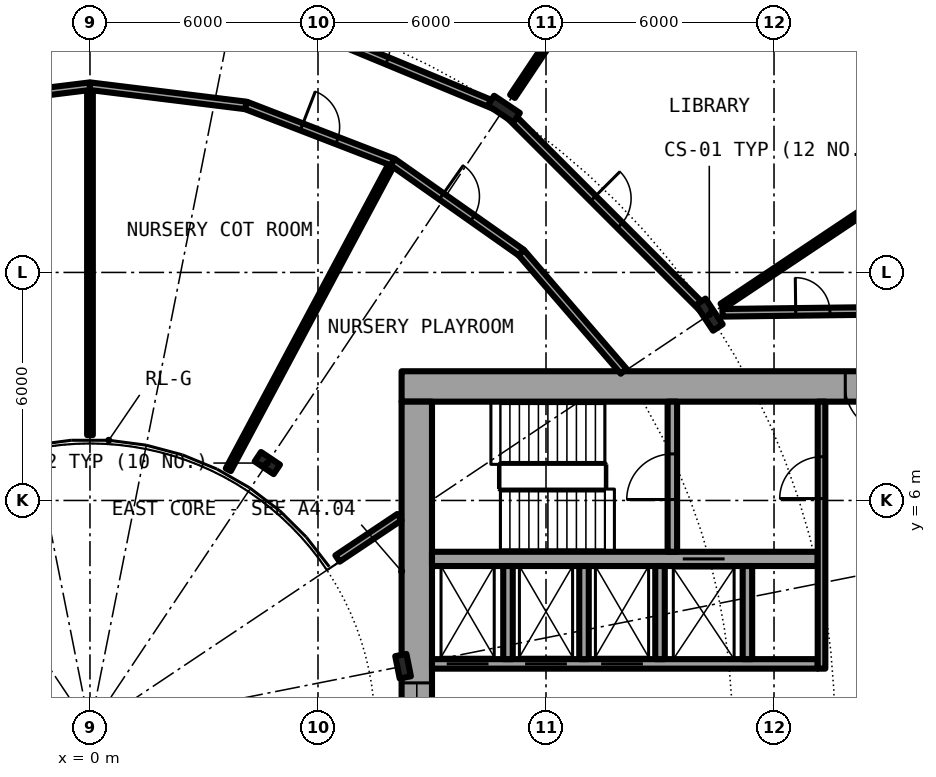
"""IFC4 building model, lengths in metres.
Left out: names, types, materials, properties, quantities, classifications, styles, units other than length and angle.
Written with IfcOpenShell. Run it as: python <this file> out.ifc"""

import sys

from ifc_helpers import new_model, si_unit, direction, frame, frame_2d, origin, origin_2d, place, context, subcontext, project, spatial, rectangle, i_section, extrude, element, fill, save


model = new_model("IFC4")
c1 = context("Model", 3, precision=1e-05, world=origin(), true_north=direction((0.0, 1.0)))
c2 = subcontext(c1, "Body", "Model", "MODEL_VIEW")
j1 = project(units=[si_unit("LENGTHUNIT", "METRE"), si_unit("PLANEANGLEUNIT", "RADIAN")], contexts=[c1])
p1 = place(None, origin())
s1 = spatial("IfcSite", under=j1, at=p1, CompositionType="ELEMENT")
p2 = place(p1, origin())
s2 = spatial("IfcBuilding", under=s1, at=p2, CompositionType="ELEMENT")
p3 = place(p2, frame((0.0, 0.0, 14.1)))
s3 = spatial("IfcBuildingStorey", under=s2, at=p3, CompositionType="ELEMENT", Elevation=14.1)
for number, where, z_axis, x_axis in (
    (1, (16.297, 10.889, 0.0), (0.0, 0.0, 1.0), (0.831, 0.556, 0.0)),
    (2, (10.889, 16.297, 0.0), (0.0, 0.0, 1.0), (0.556, 0.831, 0.0)),
):
    element("IfcColumn", number, at=place(p3, frame(where, z_axis=z_axis, x_axis=x_axis)), inside=s3, PredefinedType="COLUMN", context=c2, shape_type="SweptSolid", body=[
        extrude(i_section(OverallWidth=0.303, OverallDepth=0.814, WebThickness=0.021, FlangeThickness=0.04, FilletRadius=0.03, at=origin_2d()), origin(), (0.0, 0.0, 1.0), 4.2),
    ])
for number, where, z_axis, x_axis in (
    (3, (8.239, 1.639, 0.0), (0.0, 0.0, 1.0), (0.981, 0.195, 0.0)),
    (4, (4.667, 6.984, 0.0), (0.0, 0.0, 1.0), (0.556, 0.831, 0.0)),
):
    element("IfcColumn", number, at=place(p3, frame(where, z_axis=z_axis, x_axis=x_axis)), inside=s3, PredefinedType="COLUMN", context=c2, shape_type="SweptSolid", body=[
        extrude(i_section(OverallWidth=0.3, OverallDepth=0.6, WebThickness=0.015, FlangeThickness=0.03, FilletRadius=0.027, at=origin_2d()), origin(), (0.0, 0.0, 1.0), 4.2),
    ])
p4 = place(p3, frame((22.4, 9.0, 0.0), z_axis=(0.0, 0.0, 1.0), x_axis=(-1.0, 0.0, 0.0)))
e5 = element("IfcWall", 5, at=p4, inside=s3, PredefinedType="SHEAR", context=c2, shape_type="SweptSolid", body=[
    extrude(rectangle(XDim=14.2, YDim=0.8, at=frame_2d((7.1, 0.0))), origin(), (0.0, 0.0, 1.0), 4.2),
])
p5 = place(p4, frame((1.325, 0.0, 0.0)))
e6 = element("IfcOpeningElement", 6, at=p5, cuts=e5, PredefinedType="OPENING", context=c2, shape_type="SweptSolid", body=[
    extrude(rectangle(XDim=1.2, YDim=2.3, at=frame_2d((0.6, 1.15))), frame((0.0, 0.41, 0.0), z_axis=(0.0, -1.0, 0.0), x_axis=(1.0, 0.0, 0.0)), (0.0, 0.0, 1.0), 0.82),
])
p6 = place(p3, frame((8.6, -8.6, 0.0), z_axis=(0.0, 0.0, 1.0), x_axis=(0.0, 1.0, 0.0)))
e7 = element("IfcWall", 7, at=p6, inside=s3, PredefinedType="SHEAR", context=c2, shape_type="SweptSolid", body=[
    extrude(rectangle(XDim=17.2, YDim=0.8, at=frame_2d((8.6, 0.0))), origin(), (0.0, 0.0, 1.0), 4.2),
])
p7 = place(p6, frame((7.4, 0.0, 0.1)))
e8 = element("IfcOpeningElement", 8, at=p7, cuts=e7, PredefinedType="OPENING", context=c2, shape_type="SweptSolid", body=[
    extrude(rectangle(XDim=2.4, YDim=2.2, at=frame_2d((1.2, 1.1))), frame((0.0, 0.41, 0.0), z_axis=(0.0, -1.0, 0.0), x_axis=(1.0, 0.0, 0.0)), (0.0, 0.0, 1.0), 0.82),
])
p8 = place(p3, frame((9.0, 1.7, 0.0), z_axis=(0.0, 0.0, 1.0), x_axis=(1.0, 0.0, 0.0)))
e9 = element("IfcWall", 9, at=p8, inside=s3, PredefinedType="SHEAR", context=c2, shape_type="SweptSolid", body=[
    extrude(rectangle(XDim=10.15, YDim=0.25, at=frame_2d((5.075, 0.0))), origin(), (0.0, 0.0, 1.0), 4.2),
])
p9 = place(p8, frame((0.387, 0.0, 0.0)))
e10 = element("IfcOpeningElement", 10, at=p9, cuts=e9, PredefinedType="OPENING", context=c2, shape_type="SweptSolid", body=[
    extrude(rectangle(XDim=1.1, YDim=2.3, at=frame_2d((0.55, 1.15))), frame((0.0, 0.135, 0.0), z_axis=(0.0, -1.0, 0.0), x_axis=(1.0, 0.0, 0.0)), (0.0, 0.0, 1.0), 0.27),
])
p10 = place(p8, frame((2.45, 0.0, 0.0)))
e11 = element("IfcOpeningElement", 11, at=p10, cuts=e9, PredefinedType="OPENING", context=c2, shape_type="SweptSolid", body=[
    extrude(rectangle(XDim=1.1, YDim=2.3, at=frame_2d((0.55, 1.15))), frame((0.0, 0.135, 0.0), z_axis=(0.0, -1.0, 0.0), x_axis=(1.0, 0.0, 0.0)), (0.0, 0.0, 1.0), 0.27),
])
p11 = place(p8, frame((4.45, 0.0, 0.0)))
e12 = element("IfcOpeningElement", 12, at=p11, cuts=e9, PredefinedType="OPENING", context=c2, shape_type="SweptSolid", body=[
    extrude(rectangle(XDim=1.1, YDim=2.3, at=frame_2d((0.55, 1.15))), frame((0.0, 0.135, 0.0), z_axis=(0.0, -1.0, 0.0), x_axis=(1.0, 0.0, 0.0)), (0.0, 0.0, 1.0), 0.27),
])
p12 = place(p3, frame((9.0, 4.462, 0.0), z_axis=(0.0, 0.0, 1.0), x_axis=(1.0, 0.0, 0.0)))
e13 = element("IfcWall", 13, at=p12, inside=s3, PredefinedType="SHEAR", context=c2, shape_type="SweptSolid", body=[
    extrude(rectangle(XDim=10.15, YDim=0.375, at=frame_2d((5.075, 0.0))), origin(), (0.0, 0.0, 1.0), 4.2),
])
p13 = place(p12, frame((6.6, 0.0, 0.0)))
e14 = element("IfcOpeningElement", 14, at=p13, cuts=e13, PredefinedType="OPENING", context=c2, shape_type="SweptSolid", body=[
    extrude(rectangle(XDim=1.1, YDim=2.3, at=frame_2d((0.55, 1.15))), frame((0.0, 0.198, 0.0), z_axis=(0.0, -1.0, 0.0), x_axis=(1.0, 0.0, 0.0)), (0.0, 0.0, 1.0), 0.395),
])
p14 = place(p3, frame((15.325, 4.65, 0.0), z_axis=(0.0, 0.0, 1.0), x_axis=(0.0, 1.0, 0.0)))
e15 = element("IfcWall", 15, at=p14, inside=s3, PredefinedType="SHEAR", context=c2, shape_type="SweptSolid", body=[
    extrude(rectangle(XDim=3.95, YDim=0.25, at=frame_2d((1.975, 0.0))), origin(), (0.0, 0.0, 1.0), 4.2),
])
p15 = place(p14, frame((1.375, 0.0, 0.0)))
e16 = element("IfcOpeningElement", 16, at=p15, cuts=e15, PredefinedType="OPENING", context=c2, shape_type="SweptSolid", body=[
    extrude(rectangle(XDim=1.2, YDim=2.3, at=frame_2d((0.6, 1.15))), frame((0.0, 0.135, 0.0), z_axis=(0.0, -1.0, 0.0), x_axis=(1.0, 0.0, 0.0)), (0.0, 0.0, 1.0), 0.27),
])
for number, where, z_axis, x_axis in (
    (17, (15.0, 1.825, 0.0), (0.0, 0.0, 1.0), (0.0, 1.0, 0.0)),
    (18, (17.3, 1.825, 0.0), (0.0, 0.0, 1.0), (0.0, 1.0, 0.0)),
):
    element("IfcWall", number, at=place(p3, frame(where, z_axis=z_axis, x_axis=x_axis)), inside=s3, PredefinedType="SOLIDWALL", context=c2, shape_type="SweptSolid", body=[
        extrude(rectangle(XDim=2.45, YDim=0.25, at=frame_2d((1.225, 0.0))), origin(), (0.0, 0.0, 1.0), 3.8),
    ])
p16 = place(p3, frame((19.25, 1.575, 0.0), z_axis=(0.0, 0.0, 1.0), x_axis=(0.0, 1.0, 0.0)))
e19 = element("IfcWall", 19, at=p16, inside=s3, PredefinedType="SOLIDWALL", context=c2, shape_type="SweptSolid", body=[
    extrude(rectangle(XDim=7.025, YDim=0.2, at=frame_2d((3.513, 0.0))), origin(), (0.0, 0.0, 1.0), 3.8),
])
p17 = place(p16, frame((4.475, 0.0, 0.0)))
e20 = element("IfcOpeningElement", 20, at=p17, cuts=e19, PredefinedType="OPENING", context=c2, shape_type="SweptSolid", body=[
    extrude(rectangle(XDim=1.1, YDim=2.3, at=frame_2d((0.55, 1.15))), frame((0.0, 0.11, 0.0), z_axis=(0.0, -1.0, 0.0), x_axis=(1.0, 0.0, 0.0)), (0.0, 0.0, 1.0), 0.22),
])
for number, where, z_axis, x_axis in (
    (21, (11.0, 1.825, 0.0), (0.0, 0.0, 1.0), (0.0, 1.0, 0.0)),
    (22, (13.0, 1.825, 0.0), (0.0, 0.0, 1.0), (0.0, 1.0, 0.0)),
):
    element("IfcWall", number, at=place(p3, frame(where, z_axis=z_axis, x_axis=x_axis)), inside=s3, PredefinedType="SOLIDWALL", context=c2, shape_type="SweptSolid", body=[
        extrude(rectangle(XDim=2.45, YDim=0.25, at=frame_2d((1.225, 0.0))), origin(), (0.0, 0.0, 1.0), 3.8),
    ])
p18 = place(p3, frame((0.0, 7.72, 0.0), z_axis=(0.0, 0.0, 1.0), x_axis=(0.0, 1.0, 0.0)))
e23 = element("IfcWall", 23, at=p18, inside=s3, PredefinedType="PARTITIONING", context=c2, shape_type="SweptSolid", body=[
    extrude(rectangle(XDim=9.18, YDim=0.15, at=frame_2d((4.59, 0.0))), origin(), (0.0, 0.0, 1.0), 3.8),
])
p19 = place(p3, frame((3.64, 6.808, 0.0), z_axis=(0.0, 0.0, 1.0), x_axis=(0.471460365694, 0.881887251059, 0.0)))
e24 = element("IfcWall", 24, at=p19, inside=s3, PredefinedType="PARTITIONING", context=c2, shape_type="SweptSolid", body=[
    extrude(rectangle(XDim=9.18, YDim=0.15, at=frame_2d((4.59, 0.0))), origin(), (0.0, 0.0, 1.0), 3.8),
])
p20 = place(p3, frame((11.118, 16.633, 0.0), z_axis=(0.0, 0.0, 1.0), x_axis=(0.555650828752, 0.831415754305, 0.0)))
e25 = element("IfcWall", 25, at=p20, inside=s3, PredefinedType="PARTITIONING", context=c2, shape_type="SweptSolid", body=[
    extrude(rectangle(XDim=7.168, YDim=0.15, at=frame_2d((3.584, 0.0))), origin(), (0.0, 0.0, 1.0), 3.8),
])
p21 = place(p3, frame((16.635, 11.115, 0.0), z_axis=(0.0, 0.0, 1.0), x_axis=(0.831431488123, 0.555627285648, 0.0)))
e26 = element("IfcWall", 26, at=p21, inside=s3, PredefinedType="PARTITIONING", context=c2, shape_type="SweptSolid", body=[
    extrude(rectangle(XDim=7.168, YDim=0.15, at=frame_2d((3.584, 0.0))), origin(), (0.0, 0.0, 1.0), 3.8),
])
p22 = place(p3, frame((6.513, 4.472, 0.0), z_axis=(0.0, 0.0, 1.0), x_axis=(0.831417956244, 0.555647533996, 0.0)))
e27 = element("IfcWall", 27, at=p22, inside=s3, PredefinedType="PARTITIONING", context=c2, shape_type="SweptSolid", body=[
    extrude(rectangle(XDim=1.962, YDim=0.2, at=frame_2d((0.981, 0.0))), origin(), (0.0, 0.0, 1.0), 3.8),
])
p23 = place(p3, frame((16.643, 10.938, 0.0), z_axis=(0.0, 0.0, 1.0), x_axis=(0.999924074118, 0.012322580895, 0.0)))
e28 = element("IfcWall", 28, at=p23, inside=s3, PredefinedType="PARTITIONING", context=c2, shape_type="SweptSolid", body=[
    extrude(rectangle(XDim=5.032, YDim=0.2, at=frame_2d((2.516, 0.0))), origin(), (0.0, 0.0, 1.0), 3.8),
])
p24 = place(p23, frame((1.928, 0.0, 0.0)))
e29 = element("IfcOpeningElement", 29, at=p24, cuts=e28, PredefinedType="OPENING", context=c2, shape_type="SweptSolid", body=[
    extrude(rectangle(XDim=0.9, YDim=2.3, at=frame_2d((0.45, 1.15))), frame((0.0, 0.11, 0.0), z_axis=(0.0, -1.0, 0.0), x_axis=(1.0, 0.0, 0.0)), (0.0, 0.0, 1.0), 0.22),
])
for number, where, z_axis, x_axis in (
    (30, (-4.106, 16.394, 0.0), (0.0, 0.0, 1.0), (0.992, 0.122, 0.0)),
    (31, (0.0, 16.9, 0.0), (0.0, 0.0, 1.0), (0.992, -0.122, 0.0)),
):
    element("IfcWall", number, at=place(p3, frame(where, z_axis=z_axis, x_axis=x_axis)), inside=s3, PredefinedType="PARTITIONING", context=c2, shape_type="SweptSolid", body=[
        extrude(rectangle(XDim=4.137, YDim=0.2, at=frame_2d((2.068, 0.0))), origin(), (0.0, 0.0, 1.0), 3.8),
    ])
p25 = place(p3, frame((4.106, 16.394, 0.0), z_axis=(0.0, 0.0, 1.0), x_axis=(0.932943640288, -0.360022449363, 0.0)))
e32 = element("IfcWall", 32, at=p25, inside=s3, PredefinedType="PARTITIONING", context=c2, shape_type="SweptSolid", body=[
    extrude(rectangle(XDim=4.139, YDim=0.2, at=frame_2d((2.069, 0.0))), origin(), (0.0, 0.0, 1.0), 3.8),
])
p26 = place(p25, frame((1.569, 0.0, 0.0)))
e33 = element("IfcOpeningElement", 33, at=p26, cuts=e32, PredefinedType="OPENING", context=c2, shape_type="SweptSolid", body=[
    extrude(rectangle(XDim=1.0, YDim=2.3, at=frame_2d((0.5, 1.15))), frame((0.0, 0.11, 0.0), z_axis=(0.0, -1.0, 0.0), x_axis=(1.0, 0.0, 0.0)), (0.0, 0.0, 1.0), 0.22),
])
p27 = place(p3, frame((7.967, 14.904, 0.0), z_axis=(0.0, 0.0, 1.0), x_axis=(0.817567680547, -0.575832517079, 0.0)))
e34 = element("IfcWall", 34, at=p27, inside=s3, PredefinedType="PARTITIONING", context=c2, shape_type="SweptSolid", body=[
    extrude(rectangle(XDim=4.137, YDim=0.2, at=frame_2d((2.068, 0.0))), origin(), (0.0, 0.0, 1.0), 3.8),
])
p28 = place(p27, frame((1.568, 0.0, 0.0)))
e35 = element("IfcOpeningElement", 35, at=p28, cuts=e34, PredefinedType="OPENING", context=c2, shape_type="SweptSolid", body=[
    extrude(rectangle(XDim=1.0, YDim=2.3, at=frame_2d((0.5, 1.15))), frame((0.0, 0.11, 0.0), z_axis=(0.0, -1.0, 0.0), x_axis=(1.0, 0.0, 0.0)), (0.0, 0.0, 1.0), 0.22),
])
p29 = place(p3, frame((11.349, 12.522, 0.0), z_axis=(0.0, 0.0, 1.0), x_axis=(0.653274518104, -0.757121129012, 0.0)))
e36 = element("IfcWall", 36, at=p29, inside=s3, PredefinedType="PARTITIONING", context=c2, shape_type="SweptSolid", body=[
    extrude(rectangle(XDim=4.124, YDim=0.2, at=frame_2d((2.062, 0.0))), origin(), (0.0, 0.0, 1.0), 3.8),
])
p30 = place(p3, frame((3.966, 19.164, 0.0), z_axis=(0.0, 0.0, 1.0), x_axis=(0.923912243701, -0.382604451019, 0.0)))
e37 = element("IfcWall", 37, at=p30, inside=s3, PredefinedType="PARTITIONING", context=c2, shape_type="SweptSolid", body=[
    extrude(rectangle(XDim=7.339, YDim=0.2, at=frame_2d((3.67, 0.0))), origin(), (0.0, 0.0, 1.0), 3.38),
])
p31 = place(p30, frame((3.17, 0.0, 0.0)))
e38 = element("IfcOpeningElement", 38, at=p31, cuts=e37, PredefinedType="OPENING", context=c2, shape_type="SweptSolid", body=[
    extrude(rectangle(XDim=1.0, YDim=2.3, at=frame_2d((0.5, 1.15))), frame((0.0, 0.11, 0.0), z_axis=(0.0, -1.0, 0.0), x_axis=(1.0, 0.0, 0.0)), (0.0, 0.0, 1.0), 0.22),
])
p32 = place(p3, frame((10.998, 16.188, 0.0), z_axis=(0.0, 0.0, 1.0), x_axis=(0.707106781187, -0.707106781187, 0.0)))
e39 = element("IfcWall", 39, at=p32, inside=s3, PredefinedType="PARTITIONING", context=c2, shape_type="SweptSolid", body=[
    extrude(rectangle(XDim=7.34, YDim=0.2, at=frame_2d((3.67, 0.0))), origin(), (0.0, 0.0, 1.0), 3.38),
])
p33 = place(p32, frame((3.17, 0.0, 0.0)))
e40 = element("IfcOpeningElement", 40, at=p33, cuts=e39, PredefinedType="OPENING", context=c2, shape_type="SweptSolid", body=[
    extrude(rectangle(XDim=1.0, YDim=2.3, at=frame_2d((0.5, 1.15))), frame((0.0, 0.11, 0.0), z_axis=(0.0, -1.0, 0.0), x_axis=(1.0, 0.0, 0.0)), (0.0, 0.0, 1.0), 0.22),
])
p34 = place(p9, origin())
e41 = element("IfcDoor", 41, at=p34, inside=s3, OperationType="DOUBLE_DOOR_SLIDING", PredefinedType="DOOR", context=c2, shape_type="SweptSolid", body=[
    extrude(rectangle(XDim=1.1, YDim=2.3, at=frame_2d((0.55, 1.15))), frame((0.0, 0.025, 0.0), z_axis=(0.0, -1.0, 0.0), x_axis=(1.0, 0.0, 0.0)), (0.0, 0.0, 1.0), 0.05),
])
fill(e10, e41)
p35 = place(p10, origin())
e42 = element("IfcDoor", 42, at=p35, inside=s3, OperationType="DOUBLE_DOOR_SLIDING", PredefinedType="DOOR", context=c2, shape_type="SweptSolid", body=[
    extrude(rectangle(XDim=1.1, YDim=2.3, at=frame_2d((0.55, 1.15))), frame((0.0, 0.025, 0.0), z_axis=(0.0, -1.0, 0.0), x_axis=(1.0, 0.0, 0.0)), (0.0, 0.0, 1.0), 0.05),
])
fill(e11, e42)
p36 = place(p11, origin())
e43 = element("IfcDoor", 43, at=p36, inside=s3, OperationType="DOUBLE_DOOR_SLIDING", PredefinedType="DOOR", context=c2, shape_type="SweptSolid", body=[
    extrude(rectangle(XDim=1.1, YDim=2.3, at=frame_2d((0.55, 1.15))), frame((0.0, 0.025, 0.0), z_axis=(0.0, -1.0, 0.0), x_axis=(1.0, 0.0, 0.0)), (0.0, 0.0, 1.0), 0.05),
])
fill(e12, e43)
p37 = place(p13, origin())
e44 = element("IfcDoor", 44, at=p37, inside=s3, OperationType="DOUBLE_DOOR_SLIDING", PredefinedType="DOOR", context=c2, shape_type="SweptSolid", body=[
    extrude(rectangle(XDim=1.1, YDim=2.3, at=frame_2d((0.55, 1.15))), frame((0.0, 0.025, 0.0), z_axis=(0.0, -1.0, 0.0), x_axis=(1.0, 0.0, 0.0)), (0.0, 0.0, 1.0), 0.05),
])
fill(e14, e44)
p38 = place(p15, origin())
e45 = element("IfcDoor", 45, at=p38, inside=s3, OperationType="SINGLE_SWING_LEFT", PredefinedType="DOOR", context=c2, shape_type="SweptSolid", body=[
    extrude(rectangle(XDim=1.2, YDim=2.3, at=frame_2d((0.6, 1.15))), frame((0.0, 0.025, 0.0), z_axis=(0.0, -1.0, 0.0), x_axis=(1.0, 0.0, 0.0)), (0.0, 0.0, 1.0), 0.05),
])
fill(e16, e45)
p39 = place(p17, origin())
e46 = element("IfcDoor", 46, at=p39, inside=s3, OperationType="SINGLE_SWING_LEFT", PredefinedType="DOOR", context=c2, shape_type="SweptSolid", body=[
    extrude(rectangle(XDim=1.1, YDim=2.3, at=frame_2d((0.55, 1.15))), frame((0.0, 0.025, 0.0), z_axis=(0.0, -1.0, 0.0), x_axis=(1.0, 0.0, 0.0)), (0.0, 0.0, 1.0), 0.05),
])
fill(e20, e46)
p40 = place(p5, origin())
e47 = element("IfcDoor", 47, at=p40, inside=s3, OperationType="SINGLE_SWING_RIGHT", PredefinedType="DOOR", context=c2, shape_type="SweptSolid", body=[
    extrude(rectangle(XDim=1.2, YDim=2.3, at=frame_2d((0.6, 1.15))), frame((0.0, 0.025, 0.0), z_axis=(0.0, -1.0, 0.0), x_axis=(1.0, 0.0, 0.0)), (0.0, 0.0, 1.0), 0.05),
])
fill(e6, e47)
p41 = place(p7, origin())
e48 = element("IfcWindow", 48, at=p41, inside=s3, PartitioningType="SINGLE_PANEL", PredefinedType="WINDOW", context=c2, shape_type="SweptSolid", body=[
    extrude(rectangle(XDim=2.4, YDim=2.2, at=frame_2d((1.2, 1.1))), frame((0.0, 0.03, 0.0), z_axis=(0.0, -1.0, 0.0), x_axis=(1.0, 0.0, 0.0)), (0.0, 0.0, 1.0), 0.06),
])
fill(e8, e48)
p42 = place(p33, origin())
e49 = element("IfcDoor", 49, at=p42, inside=s3, OperationType="SINGLE_SWING_RIGHT", PredefinedType="DOOR", context=c2, shape_type="SweptSolid", body=[
    extrude(rectangle(XDim=1.0, YDim=2.3, at=frame_2d((0.5, 1.15))), frame((0.0, 0.025, 0.0), z_axis=(0.0, -1.0, 0.0), x_axis=(1.0, 0.0, 0.0)), (0.0, 0.0, 1.0), 0.05),
])
fill(e40, e49)
p43 = place(p31, origin())
e50 = element("IfcDoor", 50, at=p43, inside=s3, OperationType="SINGLE_SWING_RIGHT", PredefinedType="DOOR", context=c2, shape_type="SweptSolid", body=[
    extrude(rectangle(XDim=1.0, YDim=2.3, at=frame_2d((0.5, 1.15))), frame((0.0, 0.025, 0.0), z_axis=(0.0, -1.0, 0.0), x_axis=(1.0, 0.0, 0.0)), (0.0, 0.0, 1.0), 0.05),
])
fill(e38, e50)
p44 = place(p28, origin())
e51 = element("IfcDoor", 51, at=p44, inside=s3, OperationType="SINGLE_SWING_LEFT", PredefinedType="DOOR", context=c2, shape_type="SweptSolid", body=[
    extrude(rectangle(XDim=1.0, YDim=2.3, at=frame_2d((0.5, 1.15))), frame((0.0, 0.025, 0.0), z_axis=(0.0, -1.0, 0.0), x_axis=(1.0, 0.0, 0.0)), (0.0, 0.0, 1.0), 0.05),
])
fill(e35, e51)
p45 = place(p26, origin())
e52 = element("IfcDoor", 52, at=p45, inside=s3, OperationType="SINGLE_SWING_LEFT", PredefinedType="DOOR", context=c2, shape_type="SweptSolid", body=[
    extrude(rectangle(XDim=1.0, YDim=2.3, at=frame_2d((0.5, 1.15))), frame((0.0, 0.025, 0.0), z_axis=(0.0, -1.0, 0.0), x_axis=(1.0, 0.0, 0.0)), (0.0, 0.0, 1.0), 0.05),
])
fill(e33, e52)
p46 = place(p24, origin())
e53 = element("IfcDoor", 53, at=p46, inside=s3, OperationType="SINGLE_SWING_LEFT", PredefinedType="DOOR", context=c2, shape_type="SweptSolid", body=[
    extrude(rectangle(XDim=0.9, YDim=2.3, at=frame_2d((0.45, 1.15))), frame((0.0, 0.025, 0.0), z_axis=(0.0, -1.0, 0.0), x_axis=(1.0, 0.0, 0.0)), (0.0, 0.0, 1.0), 0.05),
])
fill(e29, e53)
save(model, sys.argv[1])
